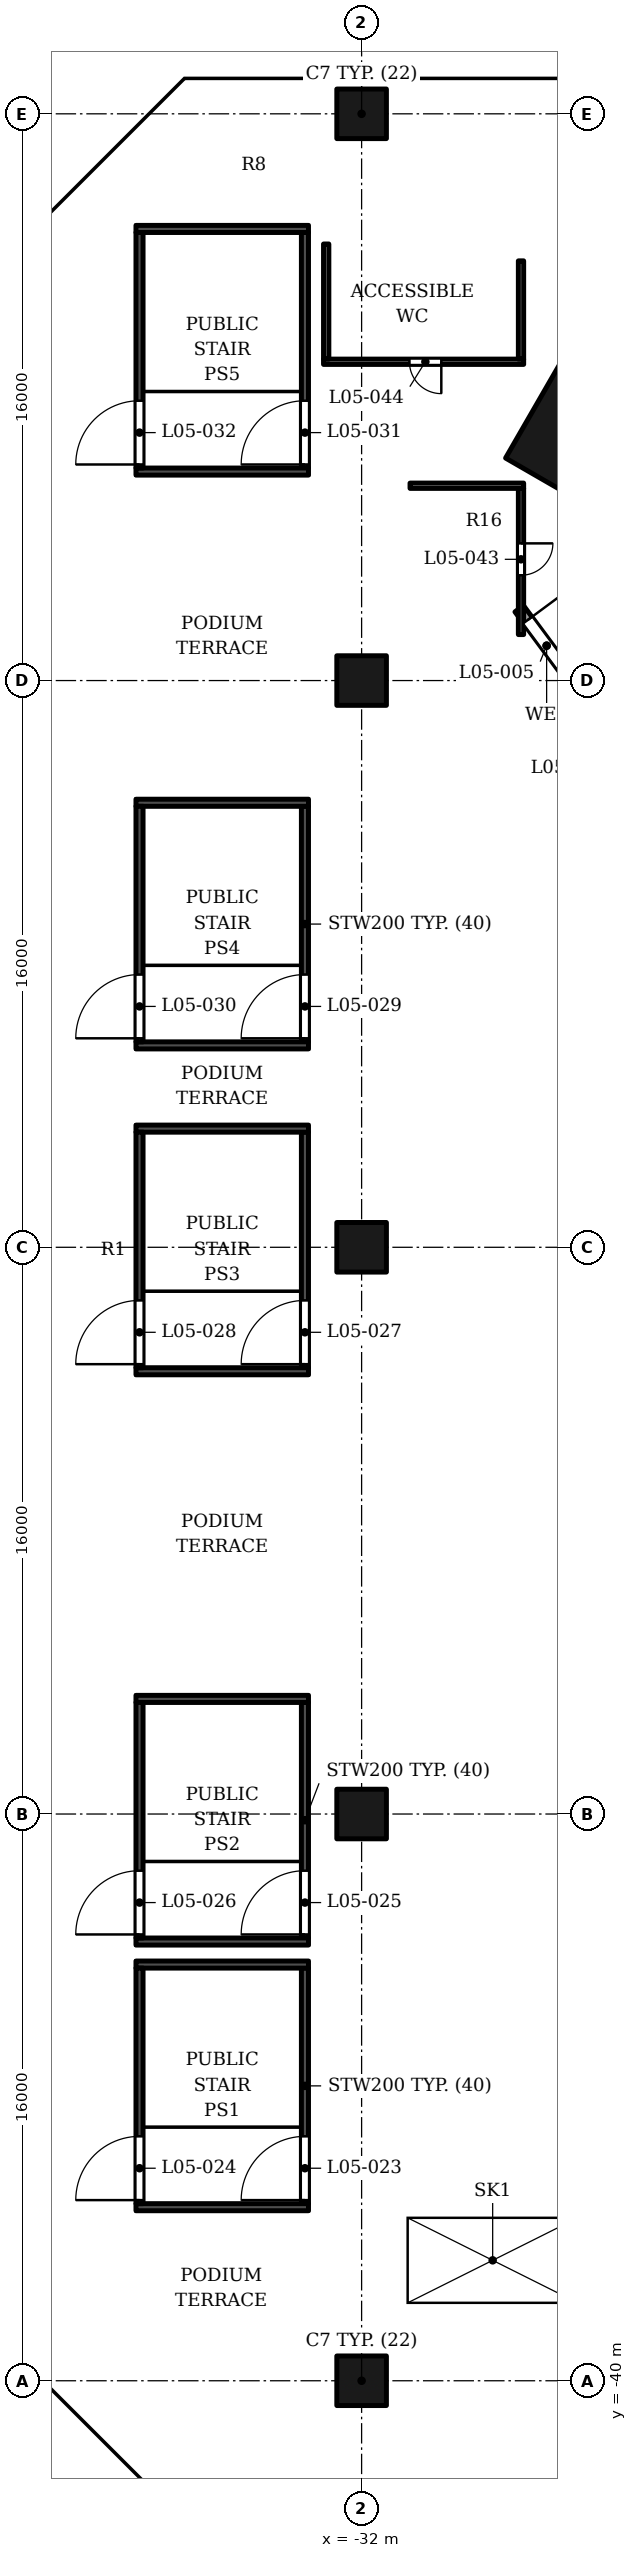
"""IFC4 building model, lengths in metres.
Left out: names, types, materials, properties, quantities, classifications, styles, units other than length and angle.
Written with IfcOpenShell. Run it as: python <this file> out.ifc"""

import sys

from ifc_helpers import new_model, si_unit, direction, frame, frame_2d, origin, origin_2d, place, context, subcontext, project, spatial, polyline, rectangle, outline, extrude, element, fill, save


model = new_model("IFC4")
c1 = context("Model", 3, precision=1e-05, world=origin(), true_north=direction((0.0, 1.0)))
c2 = subcontext(c1, "Body", "Model", "MODEL_VIEW")
j1 = project(units=[si_unit("LENGTHUNIT", "METRE"), si_unit("PLANEANGLEUNIT", "RADIAN")], contexts=[c1])
p1 = place(None, origin())
s1 = spatial("IfcSite", under=j1, at=p1, CompositionType="ELEMENT")
p2 = place(p1, origin())
s2 = spatial("IfcBuilding", under=s1, at=p2, CompositionType="ELEMENT")
p3 = place(p2, frame((0.0, 0.0, 40.0)))
s3 = spatial("IfcBuildingStorey", under=s2, at=p3, CompositionType="ELEMENT", Elevation=40.0)
for number, where, z_axis, x_axis in (
    (1, (-32.0, -40.0, 0.0), (0.0, 0.0, 1.0), (1.0, 0.0, 0.0)),
    (2, (-32.0, -24.0, 0.0), (0.0, 0.0, 1.0), (1.0, 0.0, 0.0)),
    (3, (-32.0, -8.0, 0.0), (0.0, 0.0, 1.0), (1.0, 0.0, 0.0)),
    (4, (-32.0, 8.0, 0.0), (0.0, 0.0, 1.0), (1.0, 0.0, 0.0)),
    (5, (-32.0, 24.0, 0.0), (0.0, 0.0, 1.0), (1.0, 0.0, 0.0)),
):
    element("IfcColumn", number, at=place(p3, frame(where, z_axis=z_axis, x_axis=x_axis)), inside=s3, PredefinedType="COLUMN", context=c2, shape_type="SweptSolid", body=[
        extrude(rectangle(XDim=1.4, YDim=1.4, at=origin_2d()), origin(), (0.0, 0.0, 1.0), 6.0),
    ])
p4 = place(p3, frame((-25.75, 14.867, 0.0), z_axis=(0.0, 0.0, 1.0), x_axis=(0.866025386331, -0.50000003023, 0.0)))
e6 = element("IfcColumn", 6, at=p4, inside=s3, PredefinedType="COLUMN", context=c2, shape_type="SweptSolid", body=[
    extrude(rectangle(XDim=3.2, YDim=3.2, at=origin_2d()), origin(), (0.0, 0.0, 1.0), 6.0),
])
p5 = place(p3, frame((-27.551, 10.029, 0.0), z_axis=(0.0, 0.0, 1.0), x_axis=(0.595317370228, -0.803490652531, 0.0)))
e7 = element("IfcWall", 7, at=p5, inside=s3, PredefinedType="ELEMENTEDWALL", context=c2, shape_type="SweptSolid", body=[
    extrude(rectangle(XDim=2.6, YDim=0.3, at=frame_2d((1.3, 0.0))), origin(), (0.0, 0.0, 1.0), 2.95),
])
p6 = place(p5, frame((0.4, 0.0, 0.0)))
e8 = element("IfcOpeningElement", 8, at=p6, cuts=e7, PredefinedType="OPENING", context=c2, shape_type="SweptSolid", body=[
    extrude(rectangle(XDim=1.8, YDim=2.7, at=frame_2d((0.9, 1.35))), frame((0.0, 0.16, 0.0), z_axis=(0.0, -1.0, 0.0), x_axis=(1.0, 0.0, 0.0)), (0.0, 0.0, 1.0), 0.32),
])
p7 = place(p3, origin())
e9 = element("IfcWall", 9, at=p7, inside=s3, PredefinedType="USERDEFINED", context=c2, shape_type="SweptSolid", body=[
    extrude(outline(polyline([(-31.6, -18.6), (-31.6, -17.4), (-37.6, -17.4), (-37.6, -18.6), (-31.6, -18.6)])), origin(), (0.0, 0.0, 1.0), 0.8),
])
p8 = place(p3, origin())
e10 = element("IfcWall", 10, at=p8, inside=s3, PredefinedType="USERDEFINED", context=c2, shape_type="SweptSolid", body=[
    extrude(outline(polyline([(-25.6, -3.6), (-25.6, -2.4), (-31.6, -2.4), (-31.6, -3.6), (-25.6, -3.6)])), origin(), (0.0, 0.0, 1.0), 0.8),
])
for number, where, z_axis, x_axis in (
    (11, (-38.37, -35.1, 0.0), (0.0, 0.0, 1.0), (1.0, 0.0, 0.0)),
    (12, (-38.37, -28.25, 0.0), (0.0, 0.0, 1.0), (1.0, 0.0, 0.0)),
):
    element("IfcWall", number, at=place(p3, frame(where, z_axis=z_axis, x_axis=x_axis)), inside=s3, PredefinedType="SOLIDWALL", context=c2, shape_type="SweptSolid", body=[
        extrude(rectangle(XDim=4.87, YDim=0.2, at=frame_2d((2.435, 0.0))), origin(), (0.0, 0.0, 1.0), 3.0),
    ])
p9 = place(p3, frame((-38.27, -35.0, 0.0), z_axis=(0.0, 0.0, 1.0), x_axis=(0.0, 1.0, 0.0)))
e13 = element("IfcWall", 13, at=p9, inside=s3, PredefinedType="SOLIDWALL", context=c2, shape_type="SweptSolid", body=[
    extrude(rectangle(XDim=6.65, YDim=0.2, at=frame_2d((3.325, 0.0))), origin(), (0.0, 0.0, 1.0), 3.0),
])
p10 = place(p9, frame((0.1, 0.0, 0.0)))
e14 = element("IfcOpeningElement", 14, at=p10, cuts=e13, PredefinedType="OPENING", context=c2, shape_type="SweptSolid", body=[
    extrude(rectangle(XDim=1.8, YDim=2.4, at=frame_2d((0.9, 1.2))), frame((0.0, 0.11, 0.0), z_axis=(0.0, -1.0, 0.0), x_axis=(1.0, 0.0, 0.0)), (0.0, 0.0, 1.0), 0.22),
])
p11 = place(p3, frame((-33.6, -35.0, 0.0), z_axis=(0.0, 0.0, 1.0), x_axis=(0.0, 1.0, 0.0)))
e15 = element("IfcWall", 15, at=p11, inside=s3, PredefinedType="SOLIDWALL", context=c2, shape_type="SweptSolid", body=[
    extrude(rectangle(XDim=6.65, YDim=0.2, at=frame_2d((3.325, 0.0))), origin(), (0.0, 0.0, 1.0), 3.0),
])
p12 = place(p11, frame((0.1, 0.0, 0.0)))
e16 = element("IfcOpeningElement", 16, at=p12, cuts=e15, PredefinedType="OPENING", context=c2, shape_type="SweptSolid", body=[
    extrude(rectangle(XDim=1.8, YDim=2.4, at=frame_2d((0.9, 1.2))), frame((0.0, 0.11, 0.0), z_axis=(0.0, -1.0, 0.0), x_axis=(1.0, 0.0, 0.0)), (0.0, 0.0, 1.0), 0.22),
])
for number, where, z_axis, x_axis in (
    (17, (-38.37, -27.6, 0.0), (0.0, 0.0, 1.0), (1.0, 0.0, 0.0)),
    (18, (-38.37, -20.75, 0.0), (0.0, 0.0, 1.0), (1.0, 0.0, 0.0)),
):
    element("IfcWall", number, at=place(p3, frame(where, z_axis=z_axis, x_axis=x_axis)), inside=s3, PredefinedType="SOLIDWALL", context=c2, shape_type="SweptSolid", body=[
        extrude(rectangle(XDim=4.87, YDim=0.2, at=frame_2d((2.435, 0.0))), origin(), (0.0, 0.0, 1.0), 3.0),
    ])
p13 = place(p3, frame((-38.27, -27.5, 0.0), z_axis=(0.0, 0.0, 1.0), x_axis=(0.0, 1.0, 0.0)))
e19 = element("IfcWall", 19, at=p13, inside=s3, PredefinedType="SOLIDWALL", context=c2, shape_type="SweptSolid", body=[
    extrude(rectangle(XDim=6.65, YDim=0.2, at=frame_2d((3.325, 0.0))), origin(), (0.0, 0.0, 1.0), 3.0),
])
p14 = place(p13, frame((0.1, 0.0, 0.0)))
e20 = element("IfcOpeningElement", 20, at=p14, cuts=e19, PredefinedType="OPENING", context=c2, shape_type="SweptSolid", body=[
    extrude(rectangle(XDim=1.8, YDim=2.4, at=frame_2d((0.9, 1.2))), frame((0.0, 0.11, 0.0), z_axis=(0.0, -1.0, 0.0), x_axis=(1.0, 0.0, 0.0)), (0.0, 0.0, 1.0), 0.22),
])
p15 = place(p3, frame((-33.6, -27.5, 0.0), z_axis=(0.0, 0.0, 1.0), x_axis=(0.0, 1.0, 0.0)))
e21 = element("IfcWall", 21, at=p15, inside=s3, PredefinedType="SOLIDWALL", context=c2, shape_type="SweptSolid", body=[
    extrude(rectangle(XDim=6.65, YDim=0.2, at=frame_2d((3.325, 0.0))), origin(), (0.0, 0.0, 1.0), 3.0),
])
p16 = place(p15, frame((0.1, 0.0, 0.0)))
e22 = element("IfcOpeningElement", 22, at=p16, cuts=e21, PredefinedType="OPENING", context=c2, shape_type="SweptSolid", body=[
    extrude(rectangle(XDim=1.8, YDim=2.4, at=frame_2d((0.9, 1.2))), frame((0.0, 0.11, 0.0), z_axis=(0.0, -1.0, 0.0), x_axis=(1.0, 0.0, 0.0)), (0.0, 0.0, 1.0), 0.22),
])
for number, where, z_axis, x_axis in (
    (23, (-38.37, -11.5, 0.0), (0.0, 0.0, 1.0), (1.0, 0.0, 0.0)),
    (24, (-38.37, -4.65, 0.0), (0.0, 0.0, 1.0), (1.0, 0.0, 0.0)),
):
    element("IfcWall", number, at=place(p3, frame(where, z_axis=z_axis, x_axis=x_axis)), inside=s3, PredefinedType="SOLIDWALL", context=c2, shape_type="SweptSolid", body=[
        extrude(rectangle(XDim=4.87, YDim=0.2, at=frame_2d((2.435, 0.0))), origin(), (0.0, 0.0, 1.0), 3.0),
    ])
p17 = place(p3, frame((-38.27, -11.4, 0.0), z_axis=(0.0, 0.0, 1.0), x_axis=(0.0, 1.0, 0.0)))
e25 = element("IfcWall", 25, at=p17, inside=s3, PredefinedType="SOLIDWALL", context=c2, shape_type="SweptSolid", body=[
    extrude(rectangle(XDim=6.65, YDim=0.2, at=frame_2d((3.325, 0.0))), origin(), (0.0, 0.0, 1.0), 3.0),
])
p18 = place(p17, frame((0.1, 0.0, 0.0)))
e26 = element("IfcOpeningElement", 26, at=p18, cuts=e25, PredefinedType="OPENING", context=c2, shape_type="SweptSolid", body=[
    extrude(rectangle(XDim=1.8, YDim=2.4, at=frame_2d((0.9, 1.2))), frame((0.0, 0.11, 0.0), z_axis=(0.0, -1.0, 0.0), x_axis=(1.0, 0.0, 0.0)), (0.0, 0.0, 1.0), 0.22),
])
p19 = place(p3, frame((-33.6, -11.4, 0.0), z_axis=(0.0, 0.0, 1.0), x_axis=(0.0, 1.0, 0.0)))
e27 = element("IfcWall", 27, at=p19, inside=s3, PredefinedType="SOLIDWALL", context=c2, shape_type="SweptSolid", body=[
    extrude(rectangle(XDim=6.65, YDim=0.2, at=frame_2d((3.325, 0.0))), origin(), (0.0, 0.0, 1.0), 3.0),
])
p20 = place(p19, frame((0.1, 0.0, 0.0)))
e28 = element("IfcOpeningElement", 28, at=p20, cuts=e27, PredefinedType="OPENING", context=c2, shape_type="SweptSolid", body=[
    extrude(rectangle(XDim=1.8, YDim=2.4, at=frame_2d((0.9, 1.2))), frame((0.0, 0.11, 0.0), z_axis=(0.0, -1.0, 0.0), x_axis=(1.0, 0.0, 0.0)), (0.0, 0.0, 1.0), 0.22),
])
for number, where, z_axis, x_axis in (
    (29, (-38.37, -2.3, 0.0), (0.0, 0.0, 1.0), (1.0, 0.0, 0.0)),
    (30, (-38.37, 4.55, 0.0), (0.0, 0.0, 1.0), (1.0, 0.0, 0.0)),
):
    element("IfcWall", number, at=place(p3, frame(where, z_axis=z_axis, x_axis=x_axis)), inside=s3, PredefinedType="SOLIDWALL", context=c2, shape_type="SweptSolid", body=[
        extrude(rectangle(XDim=4.87, YDim=0.2, at=frame_2d((2.435, 0.0))), origin(), (0.0, 0.0, 1.0), 3.0),
    ])
p21 = place(p3, frame((-38.27, -2.2, 0.0), z_axis=(0.0, 0.0, 1.0), x_axis=(0.0, 1.0, 0.0)))
e31 = element("IfcWall", 31, at=p21, inside=s3, PredefinedType="SOLIDWALL", context=c2, shape_type="SweptSolid", body=[
    extrude(rectangle(XDim=6.65, YDim=0.2, at=frame_2d((3.325, 0.0))), origin(), (0.0, 0.0, 1.0), 3.0),
])
p22 = place(p21, frame((0.1, 0.0, 0.0)))
e32 = element("IfcOpeningElement", 32, at=p22, cuts=e31, PredefinedType="OPENING", context=c2, shape_type="SweptSolid", body=[
    extrude(rectangle(XDim=1.8, YDim=2.4, at=frame_2d((0.9, 1.2))), frame((0.0, 0.11, 0.0), z_axis=(0.0, -1.0, 0.0), x_axis=(1.0, 0.0, 0.0)), (0.0, 0.0, 1.0), 0.22),
])
p23 = place(p3, frame((-33.6, -2.2, 0.0), z_axis=(0.0, 0.0, 1.0), x_axis=(0.0, 1.0, 0.0)))
e33 = element("IfcWall", 33, at=p23, inside=s3, PredefinedType="SOLIDWALL", context=c2, shape_type="SweptSolid", body=[
    extrude(rectangle(XDim=6.65, YDim=0.2, at=frame_2d((3.325, 0.0))), origin(), (0.0, 0.0, 1.0), 3.0),
])
p24 = place(p23, frame((0.1, 0.0, 0.0)))
e34 = element("IfcOpeningElement", 34, at=p24, cuts=e33, PredefinedType="OPENING", context=c2, shape_type="SweptSolid", body=[
    extrude(rectangle(XDim=1.8, YDim=2.4, at=frame_2d((0.9, 1.2))), frame((0.0, 0.11, 0.0), z_axis=(0.0, -1.0, 0.0), x_axis=(1.0, 0.0, 0.0)), (0.0, 0.0, 1.0), 0.22),
])
for number, where, z_axis, x_axis in (
    (35, (-38.37, 13.9, 0.0), (0.0, 0.0, 1.0), (1.0, 0.0, 0.0)),
    (36, (-38.37, 20.75, 0.0), (0.0, 0.0, 1.0), (1.0, 0.0, 0.0)),
):
    element("IfcWall", number, at=place(p3, frame(where, z_axis=z_axis, x_axis=x_axis)), inside=s3, PredefinedType="SOLIDWALL", context=c2, shape_type="SweptSolid", body=[
        extrude(rectangle(XDim=4.87, YDim=0.2, at=frame_2d((2.435, 0.0))), origin(), (0.0, 0.0, 1.0), 3.0),
    ])
p25 = place(p3, frame((-38.27, 14.0, 0.0), z_axis=(0.0, 0.0, 1.0), x_axis=(0.0, 1.0, 0.0)))
e37 = element("IfcWall", 37, at=p25, inside=s3, PredefinedType="SOLIDWALL", context=c2, shape_type="SweptSolid", body=[
    extrude(rectangle(XDim=6.65, YDim=0.2, at=frame_2d((3.325, 0.0))), origin(), (0.0, 0.0, 1.0), 3.0),
])
p26 = place(p25, frame((0.1, 0.0, 0.0)))
e38 = element("IfcOpeningElement", 38, at=p26, cuts=e37, PredefinedType="OPENING", context=c2, shape_type="SweptSolid", body=[
    extrude(rectangle(XDim=1.8, YDim=2.4, at=frame_2d((0.9, 1.2))), frame((0.0, 0.11, 0.0), z_axis=(0.0, -1.0, 0.0), x_axis=(1.0, 0.0, 0.0)), (0.0, 0.0, 1.0), 0.22),
])
p27 = place(p3, frame((-33.6, 14.0, 0.0), z_axis=(0.0, 0.0, 1.0), x_axis=(0.0, 1.0, 0.0)))
e39 = element("IfcWall", 39, at=p27, inside=s3, PredefinedType="SOLIDWALL", context=c2, shape_type="SweptSolid", body=[
    extrude(rectangle(XDim=6.65, YDim=0.2, at=frame_2d((3.325, 0.0))), origin(), (0.0, 0.0, 1.0), 3.0),
])
p28 = place(p27, frame((0.1, 0.0, 0.0)))
e40 = element("IfcOpeningElement", 40, at=p28, cuts=e39, PredefinedType="OPENING", context=c2, shape_type="SweptSolid", body=[
    extrude(rectangle(XDim=1.8, YDim=2.4, at=frame_2d((0.9, 1.2))), frame((0.0, 0.11, 0.0), z_axis=(0.0, -1.0, 0.0), x_axis=(1.0, 0.0, 0.0)), (0.0, 0.0, 1.0), 0.22),
])
p29 = place(p3, frame((-27.5, 9.298, 0.0), z_axis=(0.0, 0.0, 1.0), x_axis=(0.0, 1.0, 0.0)))
e41 = element("IfcWall", 41, at=p29, inside=s3, PredefinedType="PARTITIONING", context=c2, shape_type="SweptSolid", body=[
    extrude(rectangle(XDim=4.127, YDim=0.15, at=frame_2d((2.063, 0.0))), origin(), (0.0, 0.0, 1.0), 2.95),
])
p30 = place(p29, frame((1.675, 0.0, 0.0)))
e42 = element("IfcOpeningElement", 42, at=p30, cuts=e41, PredefinedType="OPENING", context=c2, shape_type="SweptSolid", body=[
    extrude(rectangle(XDim=0.9, YDim=2.1, at=frame_2d((0.45, 1.05))), frame((0.0, 0.085, 0.0), z_axis=(0.0, -1.0, 0.0), x_axis=(1.0, 0.0, 0.0)), (0.0, 0.0, 1.0), 0.17),
])
p31 = place(p3, frame((-30.633, 13.5, 0.0), z_axis=(0.0, 0.0, 1.0), x_axis=(1.0, 0.0, 0.0)))
e43 = element("IfcWall", 43, at=p31, inside=s3, PredefinedType="PARTITIONING", context=c2, shape_type="SweptSolid", body=[
    extrude(rectangle(XDim=3.208, YDim=0.15, at=frame_2d((1.604, 0.0))), origin(), (0.0, 0.0, 1.0), 2.95),
])
p32 = place(p3, frame((-33.075, 17.0, 0.0), z_axis=(0.0, 0.0, 1.0), x_axis=(1.0, 0.0, 0.0)))
e44 = element("IfcWall", 44, at=p32, inside=s3, PredefinedType="PARTITIONING", context=c2, shape_type="SweptSolid", body=[
    extrude(rectangle(XDim=5.65, YDim=0.15, at=frame_2d((2.825, 0.0))), origin(), (0.0, 0.0, 1.0), 2.95),
])
p33 = place(p32, frame((2.425, 0.0, 0.0)))
e45 = element("IfcOpeningElement", 45, at=p33, cuts=e44, PredefinedType="OPENING", context=c2, shape_type="SweptSolid", body=[
    extrude(rectangle(XDim=0.9, YDim=2.1, at=frame_2d((0.45, 1.05))), frame((0.0, 0.085, 0.0), z_axis=(0.0, -1.0, 0.0), x_axis=(1.0, 0.0, 0.0)), (0.0, 0.0, 1.0), 0.17),
])
p34 = place(p3, frame((-33.0, 17.075, 0.0), z_axis=(0.0, 0.0, 1.0), x_axis=(0.0, 1.0, 0.0)))
e46 = element("IfcWall", 46, at=p34, inside=s3, PredefinedType="PARTITIONING", context=c2, shape_type="SweptSolid", body=[
    extrude(rectangle(XDim=3.25, YDim=0.15, at=frame_2d((1.625, 0.0))), origin(), (0.0, 0.0, 1.0), 5.55),
])
p35 = place(p3, frame((-27.5, 17.075, 0.0), z_axis=(0.0, 0.0, 1.0), x_axis=(0.0, 1.0, 0.0)))
e47 = element("IfcWall", 47, at=p35, inside=s3, PredefinedType="PARTITIONING", context=c2, shape_type="SweptSolid", body=[
    extrude(rectangle(XDim=2.774, YDim=0.15, at=frame_2d((1.387, 0.0))), origin(), (0.0, 0.0, 1.0), 2.95),
])
p36 = place(p6, origin())
e48 = element("IfcDoor", 48, at=p36, inside=s3, OperationType="DOUBLE_DOOR_SINGLE_SWING", PredefinedType="DOOR", context=c2, shape_type="SweptSolid", body=[
    extrude(rectangle(XDim=1.8, YDim=2.7, at=frame_2d((0.9, 1.35))), frame((0.0, 0.025, 0.0), z_axis=(0.0, -1.0, 0.0), x_axis=(1.0, 0.0, 0.0)), (0.0, 0.0, 1.0), 0.05),
])
fill(e8, e48)
p37 = place(p3, frame((0.0, 0.0, -0.45)))
p38 = place(p37, frame((-28.3, -36.6, 0.0)))
p39 = place(p38, frame((0.0, 0.0, 0.4)))
e49 = element("IfcWindow", 49, at=p39, inside=s3, PartitioningType="SINGLE_PANEL", PredefinedType="SKYLIGHT", context=c2, shape_type="SweptSolid", body=[
    extrude(rectangle(XDim=2.4, YDim=4.8, at=origin_2d()), origin(), (0.0, 0.0, 1.0), 0.05),
])
p40 = place(p12, origin())
e50 = element("IfcDoor", 50, at=p40, inside=s3, OperationType="DOUBLE_DOOR_SINGLE_SWING", PredefinedType="DOOR", context=c2, shape_type="SweptSolid", body=[
    extrude(rectangle(XDim=1.8, YDim=2.4, at=frame_2d((0.9, 1.2))), frame((0.0, 0.025, 0.0), z_axis=(0.0, -1.0, 0.0), x_axis=(1.0, 0.0, 0.0)), (0.0, 0.0, 1.0), 0.05),
])
fill(e16, e50)
p41 = place(p10, origin())
e51 = element("IfcDoor", 51, at=p41, inside=s3, OperationType="DOUBLE_DOOR_SINGLE_SWING", PredefinedType="DOOR", context=c2, shape_type="SweptSolid", body=[
    extrude(rectangle(XDim=1.8, YDim=2.4, at=frame_2d((0.9, 1.2))), frame((0.0, 0.025, 0.0), z_axis=(0.0, -1.0, 0.0), x_axis=(1.0, 0.0, 0.0)), (0.0, 0.0, 1.0), 0.05),
])
fill(e14, e51)
p42 = place(p16, origin())
e52 = element("IfcDoor", 52, at=p42, inside=s3, OperationType="DOUBLE_DOOR_SINGLE_SWING", PredefinedType="DOOR", context=c2, shape_type="SweptSolid", body=[
    extrude(rectangle(XDim=1.8, YDim=2.4, at=frame_2d((0.9, 1.2))), frame((0.0, 0.025, 0.0), z_axis=(0.0, -1.0, 0.0), x_axis=(1.0, 0.0, 0.0)), (0.0, 0.0, 1.0), 0.05),
])
fill(e22, e52)
p43 = place(p14, origin())
e53 = element("IfcDoor", 53, at=p43, inside=s3, OperationType="DOUBLE_DOOR_SINGLE_SWING", PredefinedType="DOOR", context=c2, shape_type="SweptSolid", body=[
    extrude(rectangle(XDim=1.8, YDim=2.4, at=frame_2d((0.9, 1.2))), frame((0.0, 0.025, 0.0), z_axis=(0.0, -1.0, 0.0), x_axis=(1.0, 0.0, 0.0)), (0.0, 0.0, 1.0), 0.05),
])
fill(e20, e53)
p44 = place(p20, origin())
e54 = element("IfcDoor", 54, at=p44, inside=s3, OperationType="DOUBLE_DOOR_SINGLE_SWING", PredefinedType="DOOR", context=c2, shape_type="SweptSolid", body=[
    extrude(rectangle(XDim=1.8, YDim=2.4, at=frame_2d((0.9, 1.2))), frame((0.0, 0.025, 0.0), z_axis=(0.0, -1.0, 0.0), x_axis=(1.0, 0.0, 0.0)), (0.0, 0.0, 1.0), 0.05),
])
fill(e28, e54)
p45 = place(p18, origin())
e55 = element("IfcDoor", 55, at=p45, inside=s3, OperationType="DOUBLE_DOOR_SINGLE_SWING", PredefinedType="DOOR", context=c2, shape_type="SweptSolid", body=[
    extrude(rectangle(XDim=1.8, YDim=2.4, at=frame_2d((0.9, 1.2))), frame((0.0, 0.025, 0.0), z_axis=(0.0, -1.0, 0.0), x_axis=(1.0, 0.0, 0.0)), (0.0, 0.0, 1.0), 0.05),
])
fill(e26, e55)
p46 = place(p24, origin())
e56 = element("IfcDoor", 56, at=p46, inside=s3, OperationType="DOUBLE_DOOR_SINGLE_SWING", PredefinedType="DOOR", context=c2, shape_type="SweptSolid", body=[
    extrude(rectangle(XDim=1.8, YDim=2.4, at=frame_2d((0.9, 1.2))), frame((0.0, 0.025, 0.0), z_axis=(0.0, -1.0, 0.0), x_axis=(1.0, 0.0, 0.0)), (0.0, 0.0, 1.0), 0.05),
])
fill(e34, e56)
p47 = place(p22, origin())
e57 = element("IfcDoor", 57, at=p47, inside=s3, OperationType="DOUBLE_DOOR_SINGLE_SWING", PredefinedType="DOOR", context=c2, shape_type="SweptSolid", body=[
    extrude(rectangle(XDim=1.8, YDim=2.4, at=frame_2d((0.9, 1.2))), frame((0.0, 0.025, 0.0), z_axis=(0.0, -1.0, 0.0), x_axis=(1.0, 0.0, 0.0)), (0.0, 0.0, 1.0), 0.05),
])
fill(e32, e57)
p48 = place(p28, origin())
e58 = element("IfcDoor", 58, at=p48, inside=s3, OperationType="DOUBLE_DOOR_SINGLE_SWING", PredefinedType="DOOR", context=c2, shape_type="SweptSolid", body=[
    extrude(rectangle(XDim=1.8, YDim=2.4, at=frame_2d((0.9, 1.2))), frame((0.0, 0.025, 0.0), z_axis=(0.0, -1.0, 0.0), x_axis=(1.0, 0.0, 0.0)), (0.0, 0.0, 1.0), 0.05),
])
fill(e40, e58)
p49 = place(p26, origin())
e59 = element("IfcDoor", 59, at=p49, inside=s3, OperationType="DOUBLE_DOOR_SINGLE_SWING", PredefinedType="DOOR", context=c2, shape_type="SweptSolid", body=[
    extrude(rectangle(XDim=1.8, YDim=2.4, at=frame_2d((0.9, 1.2))), frame((0.0, 0.025, 0.0), z_axis=(0.0, -1.0, 0.0), x_axis=(1.0, 0.0, 0.0)), (0.0, 0.0, 1.0), 0.05),
])
fill(e38, e59)
p50 = place(p30, origin())
e60 = element("IfcDoor", 60, at=p50, inside=s3, OperationType="SINGLE_SWING_RIGHT", PredefinedType="DOOR", context=c2, shape_type="SweptSolid", body=[
    extrude(rectangle(XDim=0.9, YDim=2.1, at=frame_2d((0.45, 1.05))), frame((0.0, 0.025, 0.0), z_axis=(0.0, -1.0, 0.0), x_axis=(1.0, 0.0, 0.0)), (0.0, 0.0, 1.0), 0.05),
])
fill(e42, e60)
p51 = place(p33, origin())
e61 = element("IfcDoor", 61, at=p51, inside=s3, OperationType="SINGLE_SWING_RIGHT", PredefinedType="DOOR", context=c2, shape_type="SweptSolid", body=[
    extrude(rectangle(XDim=0.9, YDim=2.1, at=frame_2d((0.45, 1.05))), frame((0.0, 0.025, 0.0), z_axis=(0.0, -1.0, 0.0), x_axis=(1.0, 0.0, 0.0)), (0.0, 0.0, 1.0), 0.05),
])
fill(e45, e61)
save(model, sys.argv[1])
